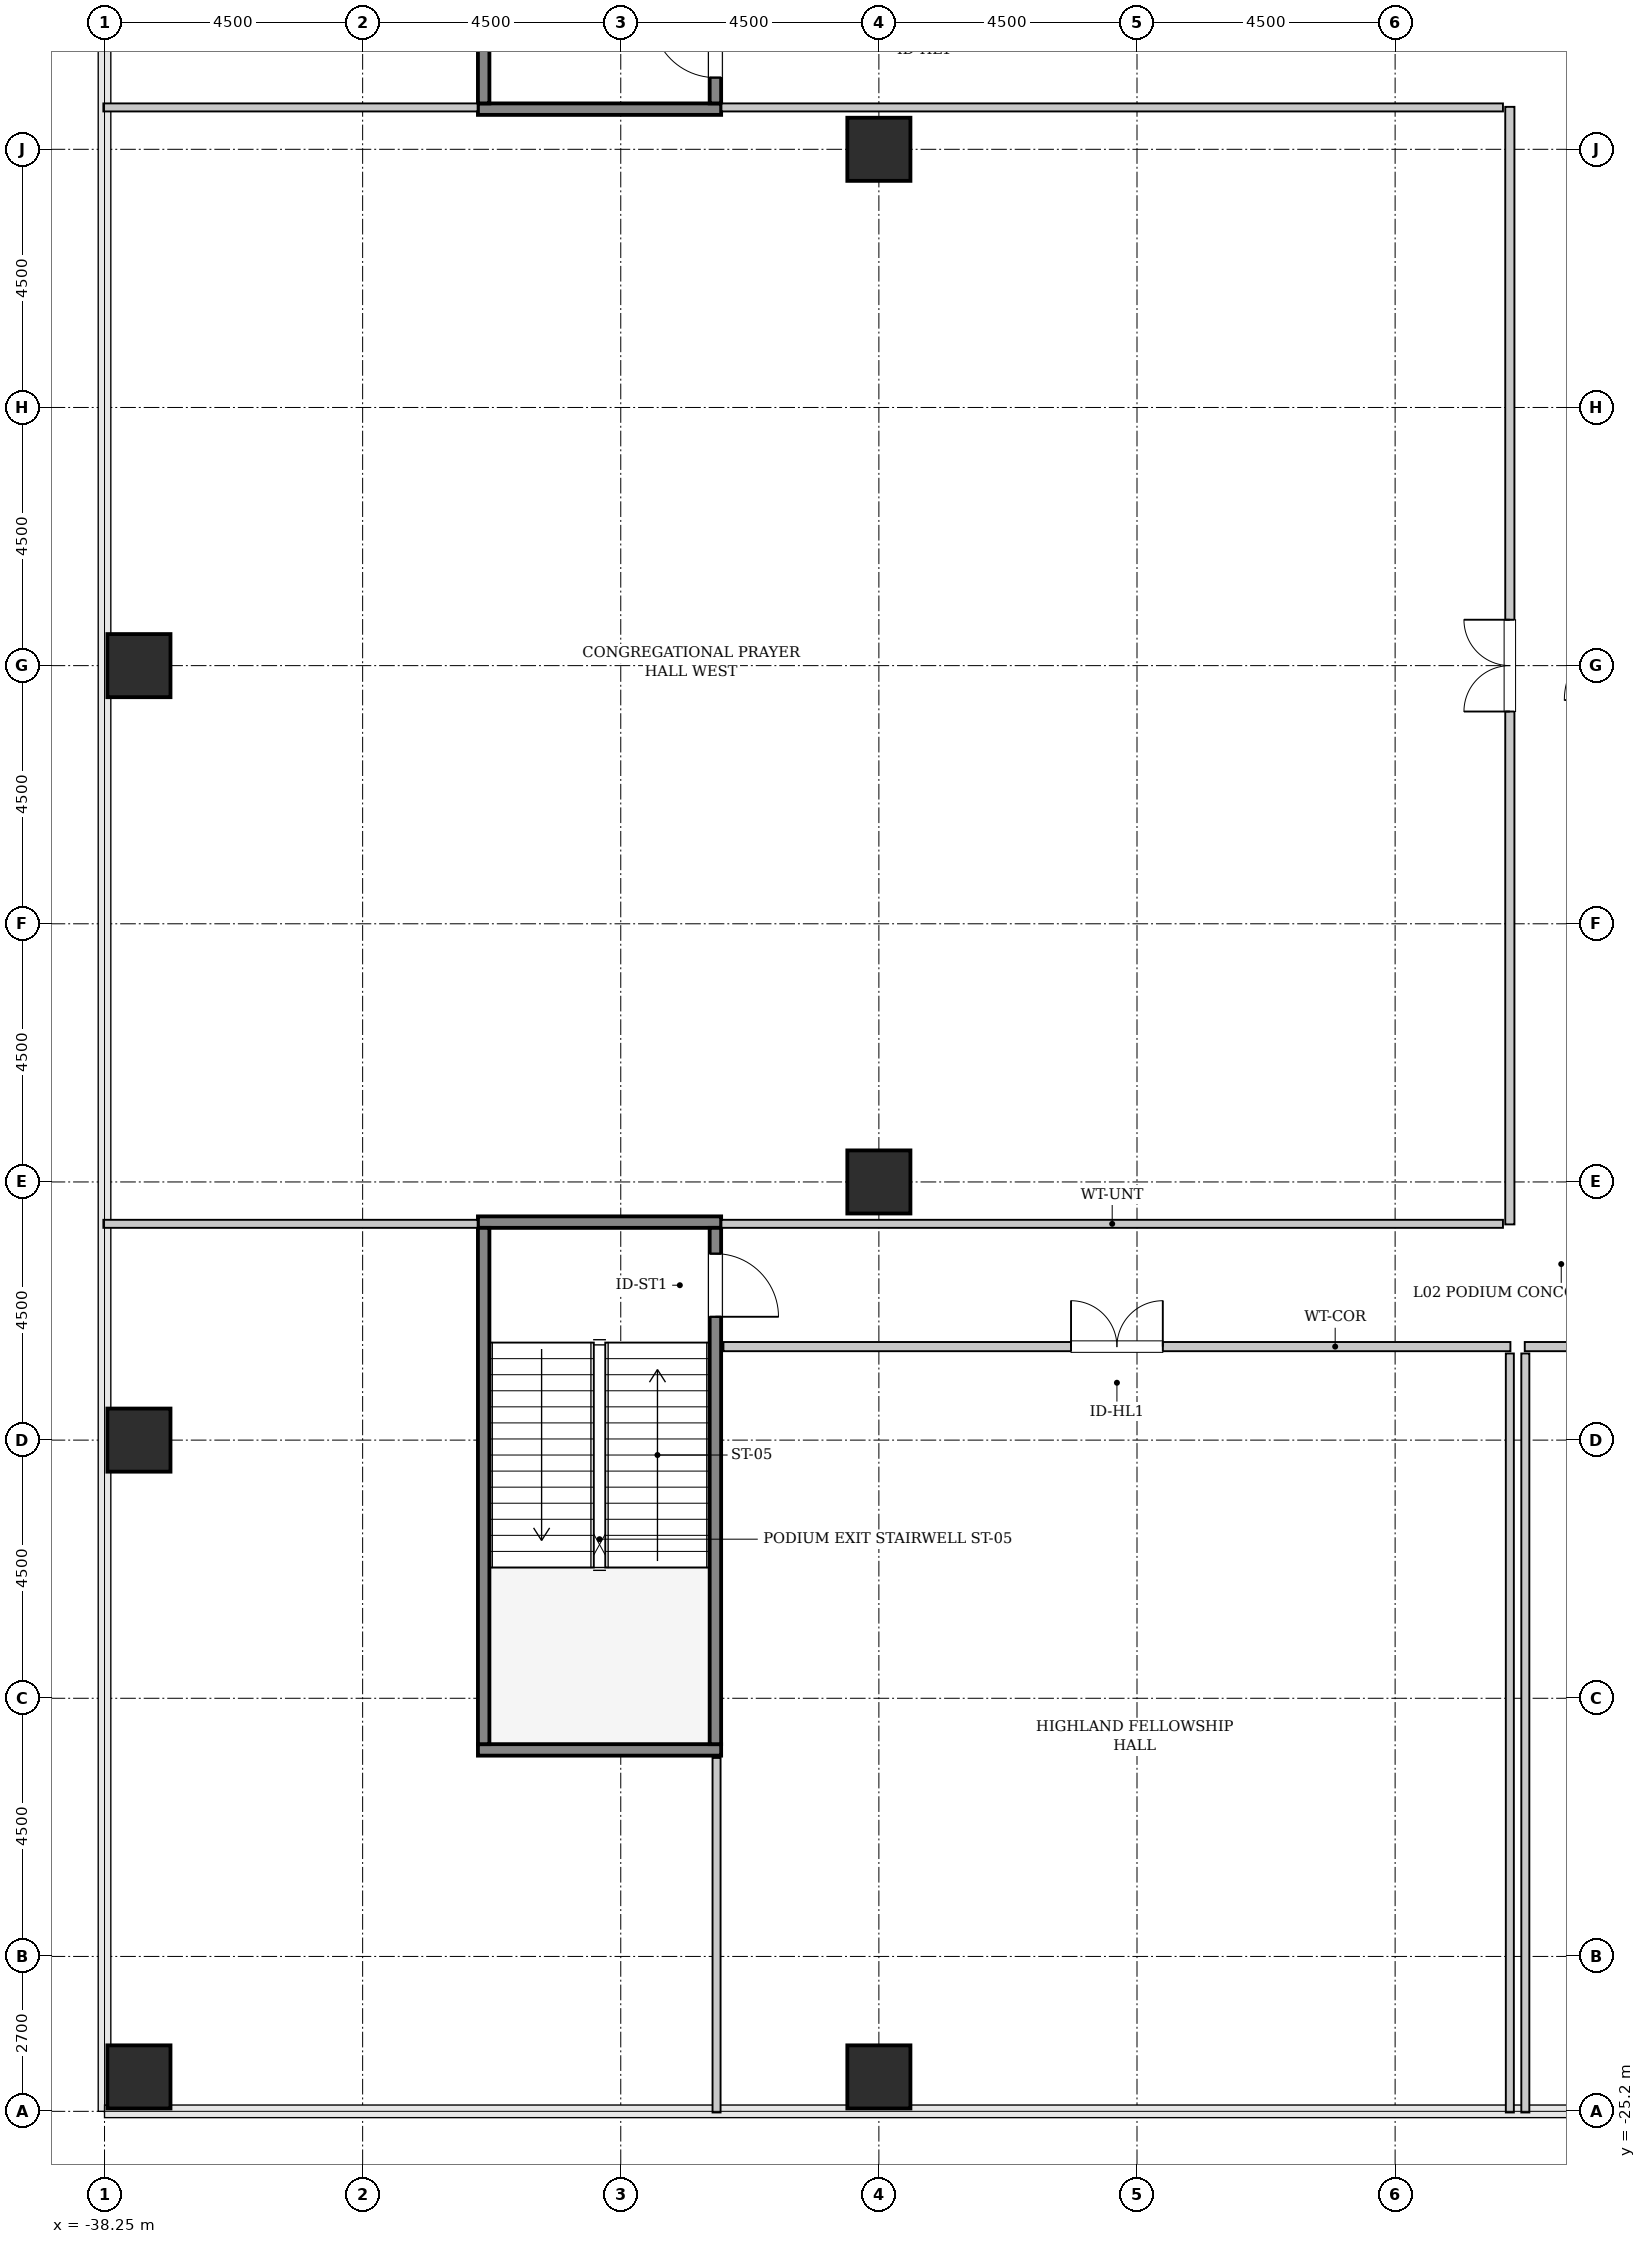
"""IFC4 building model, lengths in metres.
Left out: names, types, materials, properties, quantities, classifications, styles, units other than length and angle.
Written with IfcOpenShell. Run it as: python <this file> out.ifc"""

import sys

from ifc_helpers import new_model, si_unit, direction, frame, frame_2d, origin, origin_2d, place, context, subcontext, project, spatial, rectangle, hollow_rectangle, extrude, source, transform, mapped, element, fill, save


model = new_model("IFC4")
c1 = context("Model", 3, precision=1e-05, world=origin(), true_north=direction((0.0, 1.0)))
c2 = subcontext(c1, "Body", "Model", "MODEL_VIEW")
j1 = project(units=[si_unit("LENGTHUNIT", "METRE"), si_unit("PLANEANGLEUNIT", "RADIAN")], contexts=[c1])
p1 = place(None, origin())
s1 = spatial("IfcSite", under=j1, at=p1, CompositionType="ELEMENT")
p2 = place(p1, origin())
s2 = spatial("IfcBuilding", under=s1, at=p2, CompositionType="ELEMENT")
p3 = place(p2, frame((0.0, 0.0, 11.4)))
s3 = spatial("IfcBuildingStorey", under=s2, at=p3, CompositionType="ELEMENT", Elevation=11.4)
m1 = source(origin(), c2, "Body", "SweptSolid", [
    extrude(hollow_rectangle(XDim=1.1, YDim=1.1, WallThickness=0.055, InnerFilletRadius=0.055, OuterFilletRadius=0.11, at=origin_2d()), origin(), (0.0, 0.0, 1.0), 5.4),
])
for number, where, z_axis, x_axis in (
    (1, (-37.65, -24.6, 0.0), (0.0, 0.0, 1.0), (1.0, 0.0, 0.0)),
    (2, (-37.65, -13.5, 0.0), (0.0, 0.0, 1.0), (1.0, 0.0, 0.0)),
    (3, (-37.65, 0.0, 0.0), (0.0, 0.0, 1.0), (1.0, 0.0, 0.0)),
    (4, (-24.75, -24.6, 0.0), (0.0, 0.0, 1.0), (1.0, 0.0, 0.0)),
):
    element("IfcColumn", number, at=place(p3, frame(where, z_axis=z_axis, x_axis=x_axis)), inside=s3, PredefinedType="COLUMN", context=c2, shape_type="MappedRepresentation", body=[
        mapped(m1, transform((0.0, 0.0, 0.0), x_axis=(1.0, 0.0, 0.0), y_axis=(0.0, 1.0, 0.0), z_axis=(0.0, 0.0, 1.0), scale=1.0)),
    ])
m2 = source(origin(), c2, "Body", "SweptSolid", [
    extrude(hollow_rectangle(XDim=1.1, YDim=1.1, WallThickness=0.055, InnerFilletRadius=0.055, OuterFilletRadius=0.11, at=origin_2d()), origin(), (0.0, 0.0, 1.0), 5.4),
])
for number, where, z_axis, x_axis in (
    (5, (-24.75, -9.0, 0.0), (0.0, 0.0, 1.0), (1.0, 0.0, 0.0)),
    (6, (-24.75, 9.0, 0.0), (0.0, 0.0, 1.0), (1.0, 0.0, 0.0)),
):
    element("IfcColumn", number, at=place(p3, frame(where, z_axis=z_axis, x_axis=x_axis)), inside=s3, PredefinedType="COLUMN", context=c2, shape_type="MappedRepresentation", body=[
        mapped(m2, transform((0.0, 0.0, 0.0), x_axis=(1.0, 0.0, 0.0), y_axis=(0.0, 1.0, 0.0), z_axis=(0.0, 0.0, 1.0), scale=1.0)),
    ])
m3 = source(origin(), c2, "Body", "SweptSolid", [
    extrude(rectangle(XDim=4.24, YDim=0.2, at=frame_2d((2.12, 0.0))), origin(), (0.0, 0.0, 1.0), 5.4),
])
p4 = place(p3, frame((-27.5, 9.7, 0.0), z_axis=(0.0, 0.0, 1.0), x_axis=(-1.0, 0.0, 0.0)))
e7 = element("IfcWall", 7, at=p4, inside=s3, PredefinedType="SOLIDWALL", context=c2, shape_type="MappedRepresentation", body=[
    mapped(m3, transform((0.0, 0.0, 0.0), x_axis=(1.0, 0.0, 0.0), y_axis=(0.0, 1.0, 0.0), z_axis=(0.0, 0.0, 1.0), scale=1.0)),
])
m4 = source(origin(), c2, "Body", "SweptSolid", [
    extrude(rectangle(XDim=9.0, YDim=0.2, at=frame_2d((4.5, 0.0))), origin(), (0.0, 0.0, 1.0), 5.4),
])
p5 = place(p3, frame((-27.6, 9.8, 0.0), z_axis=(0.0, 0.0, 1.0), x_axis=(0.0, 1.0, 0.0)))
e8 = element("IfcWall", 8, at=p5, inside=s3, PredefinedType="SOLIDWALL", context=c2, shape_type="MappedRepresentation", body=[
    mapped(m4, transform((0.0, 0.0, 0.0), x_axis=(1.0, 0.0, 0.0), y_axis=(0.0, 1.0, 0.0), z_axis=(0.0, 0.0, 1.0), scale=1.0)),
])
p6 = place(p5, frame((0.45, 0.0, 0.0)))
e9 = element("IfcOpeningElement", 9, at=p6, cuts=e8, PredefinedType="OPENING", context=c2, shape_type="SweptSolid", body=[
    extrude(rectangle(XDim=1.1, YDim=2.15, at=frame_2d((0.55, 1.075))), frame((0.0, 0.11, 0.0), z_axis=(0.0, -1.0, 0.0), x_axis=(1.0, 0.0, 0.0)), (0.0, 0.0, 1.0), 0.22),
])
p7 = place(p3, frame((-31.64, 9.8, 0.0), z_axis=(0.0, 0.0, 1.0), x_axis=(0.0, 1.0, 0.0)))
e10 = element("IfcWall", 10, at=p7, inside=s3, PredefinedType="SOLIDWALL", context=c2, shape_type="MappedRepresentation", body=[
    mapped(m4, transform((0.0, 0.0, 0.0), x_axis=(1.0, 0.0, 0.0), y_axis=(0.0, 1.0, 0.0), z_axis=(0.0, 0.0, 1.0), scale=1.0)),
])
for number, where, z_axis, x_axis in (
    (11, (-31.74, -9.7, 0.0), (0.0, 0.0, 1.0), (1.0, 0.0, 0.0)),
    (12, (-31.74, -18.9, 0.0), (0.0, 0.0, 1.0), (1.0, 0.0, 0.0)),
):
    element("IfcWall", number, at=place(p3, frame(where, z_axis=z_axis, x_axis=x_axis)), inside=s3, PredefinedType="SOLIDWALL", context=c2, shape_type="MappedRepresentation", body=[
        mapped(m3, transform((0.0, 0.0, 0.0), x_axis=(1.0, 0.0, 0.0), y_axis=(0.0, 1.0, 0.0), z_axis=(0.0, 0.0, 1.0), scale=1.0)),
    ])
p8 = place(p3, frame((-31.64, -9.8, 0.0), z_axis=(0.0, 0.0, 1.0), x_axis=(0.0, -1.0, 0.0)))
e13 = element("IfcWall", 13, at=p8, inside=s3, PredefinedType="SOLIDWALL", context=c2, shape_type="MappedRepresentation", body=[
    mapped(m4, transform((0.0, 0.0, 0.0), x_axis=(1.0, 0.0, 0.0), y_axis=(0.0, 1.0, 0.0), z_axis=(0.0, 0.0, 1.0), scale=1.0)),
])
p9 = place(p3, frame((-27.6, -9.8, 0.0), z_axis=(0.0, 0.0, 1.0), x_axis=(0.0, -1.0, 0.0)))
e14 = element("IfcWall", 14, at=p9, inside=s3, PredefinedType="SOLIDWALL", context=c2, shape_type="MappedRepresentation", body=[
    mapped(m4, transform((0.0, 0.0, 0.0), x_axis=(1.0, 0.0, 0.0), y_axis=(0.0, 1.0, 0.0), z_axis=(0.0, 0.0, 1.0), scale=1.0)),
])
p10 = place(p9, frame((0.45, 0.0, 0.0)))
e15 = element("IfcOpeningElement", 15, at=p10, cuts=e14, PredefinedType="OPENING", context=c2, shape_type="SweptSolid", body=[
    extrude(rectangle(XDim=1.1, YDim=2.15, at=frame_2d((0.55, 1.075))), frame((0.0, 0.11, 0.0), z_axis=(0.0, -1.0, 0.0), x_axis=(1.0, 0.0, 0.0)), (0.0, 0.0, 1.0), 0.22),
])
m5 = source(origin(), c2, "Body", "SweptSolid", [
    extrude(rectangle(XDim=19.48, YDim=0.16, at=frame_2d((9.74, 0.0))), origin(), (0.0, 0.0, 1.0), 5.085),
])
p11 = place(p3, frame((-13.75, -9.74, 0.0), z_axis=(0.0, 0.0, 1.0), x_axis=(0.0, 1.0, 0.0)))
e16 = element("IfcWall", 16, at=p11, inside=s3, PredefinedType="PARTITIONING", context=c2, shape_type="MappedRepresentation", body=[
    mapped(m5, transform((0.0, 0.0, 0.0), x_axis=(1.0, 0.0, 0.0), y_axis=(0.0, 1.0, 0.0), z_axis=(0.0, 0.0, 1.0), scale=1.0)),
])
p12 = place(p11, frame((8.94, 0.0, 0.0)))
e17 = element("IfcOpeningElement", 17, at=p12, cuts=e16, PredefinedType="OPENING", context=c2, shape_type="SweptSolid", body=[
    extrude(rectangle(XDim=1.6, YDim=2.3, at=frame_2d((0.8, 1.15))), frame((0.0, 0.09, 0.0), z_axis=(0.0, -1.0, 0.0), x_axis=(1.0, 0.0, 0.0)), (0.0, 0.0, 1.0), 0.18),
])
m6 = source(origin(), c2, "Body", "SweptSolid", [
    extrude(rectangle(XDim=6.525, YDim=0.14, at=frame_2d((3.262, 0.0))), origin(), (0.0, 0.0, 1.0), 5.085),
])
p13 = place(p3, frame((-38.27, -9.73, 0.0), z_axis=(0.0, 0.0, 1.0), x_axis=(1.0, 0.0, 0.0)))
e18 = element("IfcWall", 18, at=p13, inside=s3, PredefinedType="PARTITIONING", context=c2, shape_type="MappedRepresentation", body=[
    mapped(m6, transform((0.0, 0.0, 0.0), x_axis=(1.0, 0.0, 0.0), y_axis=(0.0, 1.0, 0.0), z_axis=(0.0, 0.0, 1.0), scale=1.0)),
])
m7 = source(origin(), c2, "Body", "SweptSolid", [
    extrude(rectangle(XDim=13.625, YDim=0.14, at=frame_2d((6.812, 0.0))), origin(), (0.0, 0.0, 1.0), 5.085),
])
for number, where, z_axis, x_axis in (
    (19, (-27.495, -9.73, 0.0), (0.0, 0.0, 1.0), (1.0, 0.0, 0.0)),
    (20, (-27.495, 9.73, 0.0), (0.0, 0.0, 1.0), (1.0, 0.0, 0.0)),
):
    element("IfcWall", number, at=place(p3, frame(where, z_axis=z_axis, x_axis=x_axis)), inside=s3, PredefinedType="PARTITIONING", context=c2, shape_type="MappedRepresentation", body=[
        mapped(m7, transform((0.0, 0.0, 0.0), x_axis=(1.0, 0.0, 0.0), y_axis=(0.0, 1.0, 0.0), z_axis=(0.0, 0.0, 1.0), scale=1.0)),
    ])
p14 = place(p3, frame((-38.27, 9.73, 0.0), z_axis=(0.0, 0.0, 1.0), x_axis=(1.0, 0.0, 0.0)))
e21 = element("IfcWall", 21, at=p14, inside=s3, PredefinedType="PARTITIONING", context=c2, shape_type="MappedRepresentation", body=[
    mapped(m6, transform((0.0, 0.0, 0.0), x_axis=(1.0, 0.0, 0.0), y_axis=(0.0, 1.0, 0.0), z_axis=(0.0, 0.0, 1.0), scale=1.0)),
])
m8 = source(origin(), c2, "Body", "SweptSolid", [
    extrude(rectangle(XDim=13.72, YDim=0.16, at=frame_2d((6.86, 0.0))), origin(), (0.0, 0.0, 1.0), 5.085),
])
p15 = place(p3, frame((-27.46, -11.87, 0.0), z_axis=(0.0, 0.0, 1.0), x_axis=(1.0, 0.0, 0.0)))
e22 = element("IfcWall", 22, at=p15, inside=s3, PredefinedType="PARTITIONING", context=c2, shape_type="MappedRepresentation", body=[
    mapped(m8, transform((0.0, 0.0, 0.0), x_axis=(1.0, 0.0, 0.0), y_axis=(0.0, 1.0, 0.0), z_axis=(0.0, 0.0, 1.0), scale=1.0)),
])
p16 = place(p15, frame((6.06, 0.0, 0.0)))
e23 = element("IfcOpeningElement", 23, at=p16, cuts=e22, PredefinedType="OPENING", context=c2, shape_type="SweptSolid", body=[
    extrude(rectangle(XDim=1.6, YDim=2.3, at=frame_2d((0.8, 1.15))), frame((0.0, 0.09, 0.0), z_axis=(0.0, -1.0, 0.0), x_axis=(1.0, 0.0, 0.0)), (0.0, 0.0, 1.0), 0.18),
])
m9 = source(origin(), c2, "Body", "SweptSolid", [
    extrude(rectangle(XDim=13.23, YDim=0.14, at=frame_2d((6.615, 0.0))), origin(), (0.0, 0.0, 1.0), 5.085),
])
p17 = place(p3, frame((-13.75, -25.22, 0.0), z_axis=(0.0, 0.0, 1.0), x_axis=(0.0, 1.0, 0.0)))
e24 = element("IfcWall", 24, at=p17, inside=s3, PredefinedType="PARTITIONING", context=c2, shape_type="MappedRepresentation", body=[
    mapped(m9, transform((0.0, 0.0, 0.0), x_axis=(1.0, 0.0, 0.0), y_axis=(0.0, 1.0, 0.0), z_axis=(0.0, 0.0, 1.0), scale=1.0)),
])
m10 = source(origin(), c2, "Body", "SweptSolid", [
    extrude(rectangle(XDim=6.18, YDim=0.14, at=frame_2d((3.09, 0.0))), origin(), (0.0, 0.0, 1.0), 5.085),
])
p18 = place(p3, frame((-27.58, -25.22, 0.0), z_axis=(0.0, 0.0, 1.0), x_axis=(0.0, 1.0, 0.0)))
e25 = element("IfcWall", 25, at=p18, inside=s3, PredefinedType="PARTITIONING", context=c2, shape_type="MappedRepresentation", body=[
    mapped(m10, transform((0.0, 0.0, 0.0), x_axis=(1.0, 0.0, 0.0), y_axis=(0.0, 1.0, 0.0), z_axis=(0.0, 0.0, 1.0), scale=1.0)),
])
m11 = source(origin(), c2, "Body", "SweptSolid", [
    extrude(rectangle(XDim=31.95, YDim=0.16, at=frame_2d((15.975, 0.0))), origin(), (0.0, 0.0, 1.0), 5.085),
])
p19 = place(p3, frame((-13.49, -11.87, 0.0), z_axis=(0.0, 0.0, 1.0), x_axis=(1.0, 0.0, 0.0)))
e26 = element("IfcWall", 26, at=p19, inside=s3, PredefinedType="PARTITIONING", context=c2, shape_type="MappedRepresentation", body=[
    mapped(m11, transform((0.0, 0.0, 0.0), x_axis=(1.0, 0.0, 0.0), y_axis=(0.0, 1.0, 0.0), z_axis=(0.0, 0.0, 1.0), scale=1.0)),
])
p20 = place(p19, frame((28.533, 0.0, 0.0)))
e27 = element("IfcOpeningElement", 27, at=p20, cuts=e26, PredefinedType="OPENING", context=c2, shape_type="SweptSolid", body=[
    extrude(rectangle(XDim=1.6, YDim=2.3, at=frame_2d((0.8, 1.15))), frame((0.0, 0.09, 0.0), z_axis=(0.0, -1.0, 0.0), x_axis=(1.0, 0.0, 0.0)), (0.0, 0.0, 1.0), 0.18),
])
p21 = place(p3, frame((-13.48, -25.22, 0.0), z_axis=(0.0, 0.0, 1.0), x_axis=(0.0, 1.0, 0.0)))
e28 = element("IfcWall", 28, at=p21, inside=s3, PredefinedType="PARTITIONING", context=c2, shape_type="MappedRepresentation", body=[
    mapped(m9, transform((0.0, 0.0, 0.0), x_axis=(1.0, 0.0, 0.0), y_axis=(0.0, 1.0, 0.0), z_axis=(0.0, 0.0, 1.0), scale=1.0)),
])
m12 = source(origin(), c2, "Body", "SweptSolid", [
    extrude(rectangle(XDim=1.1, YDim=2.15, at=frame_2d((0.55, 1.075))), frame((0.0, 0.025, 0.0), z_axis=(0.0, -1.0, 0.0), x_axis=(1.0, 0.0, 0.0)), (0.0, 0.0, 1.0), 0.05),
])
p22 = place(p6, origin())
e29 = element("IfcDoor", 29, at=p22, inside=s3, OperationType="SINGLE_SWING_RIGHT", PredefinedType="DOOR", context=c2, shape_type="MappedRepresentation", body=[
    mapped(m12, transform((0.0, 0.0, 0.0), x_axis=(1.0, 0.0, 0.0), y_axis=(0.0, 1.0, 0.0), z_axis=(0.0, 0.0, 1.0), scale=1.0)),
])
fill(e9, e29)
p23 = place(p10, origin())
e30 = element("IfcDoor", 30, at=p23, inside=s3, OperationType="SINGLE_SWING_RIGHT", PredefinedType="DOOR", context=c2, shape_type="MappedRepresentation", body=[
    mapped(m12, transform((0.0, 0.0, 0.0), x_axis=(1.0, 0.0, 0.0), y_axis=(0.0, 1.0, 0.0), z_axis=(0.0, 0.0, 1.0), scale=1.0)),
])
fill(e15, e30)
m13 = source(origin(), c2, "Body", "SweptSolid", [
    extrude(rectangle(XDim=1.6, YDim=2.3, at=frame_2d((0.8, 1.15))), frame((0.0, 0.025, 0.0), z_axis=(0.0, -1.0, 0.0), x_axis=(1.0, 0.0, 0.0)), (0.0, 0.0, 1.0), 0.05),
])
p24 = place(p12, origin())
e31 = element("IfcDoor", 31, at=p24, inside=s3, OperationType="DOUBLE_DOOR_SINGLE_SWING", PredefinedType="DOOR", context=c2, shape_type="MappedRepresentation", body=[
    mapped(m13, transform((0.0, 0.0, 0.0), x_axis=(1.0, 0.0, 0.0), y_axis=(0.0, 1.0, 0.0), z_axis=(0.0, 0.0, 1.0), scale=1.0)),
])
fill(e17, e31)
p25 = place(p16, origin())
e32 = element("IfcDoor", 32, at=p25, inside=s3, OperationType="DOUBLE_DOOR_SINGLE_SWING", PredefinedType="DOOR", context=c2, shape_type="MappedRepresentation", body=[
    mapped(m13, transform((0.0, 0.0, 0.0), x_axis=(1.0, 0.0, 0.0), y_axis=(0.0, 1.0, 0.0), z_axis=(0.0, 0.0, 1.0), scale=1.0)),
])
fill(e23, e32)
save(model, sys.argv[1])
